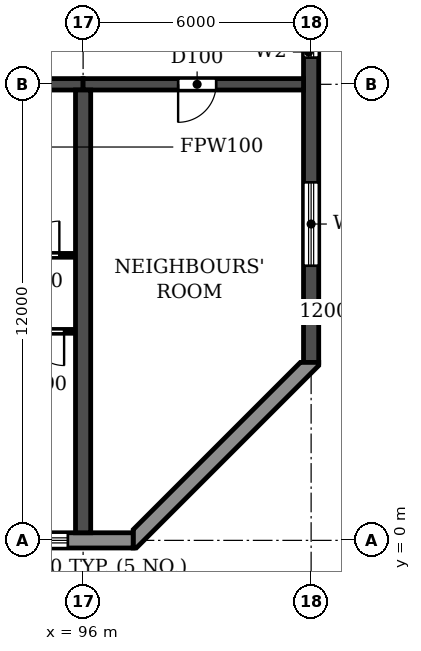
"""IFC4 building model, lengths in metres.
Left out: names, types, materials, properties, quantities, classifications, styles, units other than length and angle.
Written with IfcOpenShell. Run it as: python <this file> out.ifc"""

import sys

from ifc_helpers import new_model, si_unit, direction, frame, frame_2d, origin, place, context, subcontext, project, spatial, polyline, rectangle, outline, extrude, element, fill, save


model = new_model("IFC4")
c1 = context("Model", 3, precision=1e-05, world=origin(), true_north=direction((0.0, 1.0)))
c2 = subcontext(c1, "Body", "Model", "MODEL_VIEW")
j1 = project(units=[si_unit("LENGTHUNIT", "METRE"), si_unit("PLANEANGLEUNIT", "RADIAN")], contexts=[c1])
p1 = place(None, origin())
s1 = spatial("IfcSite", under=j1, at=p1, CompositionType="ELEMENT")
p2 = place(p1, origin())
s2 = spatial("IfcBuilding", under=s1, at=p2, CompositionType="ELEMENT")
p3 = place(p2, frame((0.0, 0.0, 43.2)))
s3 = spatial("IfcBuildingStorey", under=s2, at=p3, CompositionType="ELEMENT", Elevation=43.2)
p4 = place(p3, frame((96.0, 0.2, 0.0), z_axis=(0.0, 0.0, 1.0), x_axis=(0.0, 1.0, 0.0)))
e1 = element("IfcWall", 1, at=p4, inside=s3, PredefinedType="SHEAR", context=c2, shape_type="SweptSolid", body=[
    extrude(rectangle(XDim=11.65, YDim=0.4, at=frame_2d((5.825, 0.0))), origin(), (0.0, 0.0, 1.0), 3.05),
])
p5 = place(p3, frame((102.0, 4.683, 0.0), z_axis=(0.0, 0.0, 1.0), x_axis=(0.0, 1.0, 0.0)))
e2 = element("IfcWall", 2, at=p5, inside=s3, PredefinedType="SHEAR", context=c2, shape_type="SweptSolid", body=[
    extrude(rectangle(XDim=35.434, YDim=0.4, at=frame_2d((17.717, 0.0))), origin(), (0.0, 0.0, 1.0), 3.05),
])
p6 = place(p5, frame((15.917, 0.0, 0.9)))
e3 = element("IfcOpeningElement", 3, at=p6, cuts=e2, PredefinedType="OPENING", context=c2, shape_type="SweptSolid", body=[
    extrude(rectangle(XDim=1.2, YDim=1.5, at=frame_2d((0.6, 0.75))), frame((0.0, 0.21, 0.0), z_axis=(0.0, -1.0, 0.0), x_axis=(1.0, 0.0, 0.0)), (0.0, 0.0, 1.0), 0.42),
])
p7 = place(p5, frame((23.817, 0.0, 0.9)))
e4 = element("IfcOpeningElement", 4, at=p7, cuts=e2, PredefinedType="OPENING", context=c2, shape_type="SweptSolid", body=[
    extrude(rectangle(XDim=1.2, YDim=1.5, at=frame_2d((0.6, 0.75))), frame((0.0, 0.21, 0.0), z_axis=(0.0, -1.0, 0.0), x_axis=(1.0, 0.0, 0.0)), (0.0, 0.0, 1.0), 0.42),
])
p8 = place(p5, frame((8.017, 0.0, 0.9)))
e5 = element("IfcOpeningElement", 5, at=p8, cuts=e2, PredefinedType="OPENING", context=c2, shape_type="SweptSolid", body=[
    extrude(rectangle(XDim=1.2, YDim=1.5, at=frame_2d((0.6, 0.75))), frame((0.0, 0.21, 0.0), z_axis=(0.0, -1.0, 0.0), x_axis=(1.0, 0.0, 0.0)), (0.0, 0.0, 1.0), 0.42),
])
p9 = place(p5, frame((29.493, 0.0, 0.6)))
e6 = element("IfcOpeningElement", 6, at=p9, cuts=e2, PredefinedType="OPENING", context=c2, shape_type="SweptSolid", body=[
    extrude(rectangle(XDim=2.2, YDim=1.8, at=frame_2d((1.1, 0.9))), frame((0.0, 0.21, 0.0), z_axis=(0.0, -1.0, 0.0), x_axis=(1.0, 0.0, 0.0)), (0.0, 0.0, 1.0), 0.42),
])
p10 = place(p5, frame((2.541, 0.0, 0.6)))
e7 = element("IfcOpeningElement", 7, at=p10, cuts=e2, PredefinedType="OPENING", context=c2, shape_type="SweptSolid", body=[
    extrude(rectangle(XDim=2.2, YDim=1.8, at=frame_2d((1.1, 0.9))), frame((0.0, 0.21, 0.0), z_axis=(0.0, -1.0, 0.0), x_axis=(1.0, 0.0, 0.0)), (0.0, 0.0, 1.0), 0.42),
])
p11 = place(p3, frame((90.0, 12.0, 0.0), z_axis=(0.0, 0.0, 1.0), x_axis=(1.0, 0.0, 0.0)))
e8 = element("IfcWall", 8, at=p11, inside=s3, PredefinedType="SHEAR", context=c2, shape_type="SweptSolid", body=[
    extrude(rectangle(XDim=6.0, YDim=0.3, at=frame_2d((3.0, 0.0))), origin(), (0.0, 0.0, 1.0), 2.45),
])
p12 = place(p11, frame((2.45, 0.0, 0.0)))
e9 = element("IfcOpeningElement", 9, at=p12, cuts=e8, PredefinedType="OPENING", context=c2, shape_type="SweptSolid", body=[
    extrude(rectangle(XDim=1.0, YDim=2.1, at=frame_2d((0.5, 1.05))), frame((0.0, 0.16, 0.0), z_axis=(0.0, -1.0, 0.0), x_axis=(1.0, 0.0, 0.0)), (0.0, 0.0, 1.0), 0.32),
])
p13 = place(p3, frame((96.0, 12.0, 0.0), z_axis=(0.0, 0.0, 1.0), x_axis=(1.0, 0.0, 0.0)))
e10 = element("IfcWall", 10, at=p13, inside=s3, PredefinedType="SHEAR", context=c2, shape_type="SweptSolid", body=[
    extrude(rectangle(XDim=5.8, YDim=0.3, at=frame_2d((2.9, 0.0))), origin(), (0.0, 0.0, 1.0), 2.45),
])
p14 = place(p13, frame((2.5, 0.0, 0.0)))
e11 = element("IfcOpeningElement", 11, at=p14, cuts=e10, PredefinedType="OPENING", context=c2, shape_type="SweptSolid", body=[
    extrude(rectangle(XDim=1.0, YDim=2.1, at=frame_2d((0.5, 1.05))), frame((0.0, 0.16, 0.0), z_axis=(0.0, -1.0, 0.0), x_axis=(1.0, 0.0, 0.0)), (0.0, 0.0, 1.0), 0.32),
])
p15 = place(p3, frame((4.683, 0.0, 0.0), z_axis=(0.0, 0.0, 1.0), x_axis=(1.0, 0.0, 0.0)))
e12 = element("IfcWall", 12, at=p15, inside=s3, PredefinedType="STANDARD", context=c2, shape_type="SweptSolid", body=[
    extrude(rectangle(XDim=92.634, YDim=0.4, at=frame_2d((46.317, 0.0))), origin(), (0.0, 0.0, 1.0), 3.05),
])
p16 = place(p15, frame((1.717, 0.0, 0.9)))
e13 = element("IfcOpeningElement", 13, at=p16, cuts=e12, PredefinedType="OPENING", context=c2, shape_type="SweptSolid", body=[
    extrude(rectangle(XDim=2.2, YDim=1.5, at=frame_2d((1.1, 0.75))), frame((0.0, 0.21, 0.0), z_axis=(0.0, -1.0, 0.0), x_axis=(1.0, 0.0, 0.0)), (0.0, 0.0, 1.0), 0.42),
])
p17 = place(p15, frame((4.717, 0.0, 0.9)))
e14 = element("IfcOpeningElement", 14, at=p17, cuts=e12, PredefinedType="OPENING", context=c2, shape_type="SweptSolid", body=[
    extrude(rectangle(XDim=2.2, YDim=1.5, at=frame_2d((1.1, 0.75))), frame((0.0, 0.21, 0.0), z_axis=(0.0, -1.0, 0.0), x_axis=(1.0, 0.0, 0.0)), (0.0, 0.0, 1.0), 0.42),
])
p18 = place(p15, frame((7.717, 0.0, 0.9)))
e15 = element("IfcOpeningElement", 15, at=p18, cuts=e12, PredefinedType="OPENING", context=c2, shape_type="SweptSolid", body=[
    extrude(rectangle(XDim=2.2, YDim=1.5, at=frame_2d((1.1, 0.75))), frame((0.0, 0.21, 0.0), z_axis=(0.0, -1.0, 0.0), x_axis=(1.0, 0.0, 0.0)), (0.0, 0.0, 1.0), 0.42),
])
p19 = place(p15, frame((10.917, 0.0, 0.0)))
e16 = element("IfcOpeningElement", 16, at=p19, cuts=e12, PredefinedType="OPENING", context=c2, shape_type="SweptSolid", body=[
    extrude(rectangle(XDim=1.8, YDim=2.4, at=frame_2d((0.9, 1.2))), frame((0.0, 0.21, 0.0), z_axis=(0.0, -1.0, 0.0), x_axis=(1.0, 0.0, 0.0)), (0.0, 0.0, 1.0), 0.42),
])
p20 = place(p15, frame((13.717, 0.0, 0.9)))
e17 = element("IfcOpeningElement", 17, at=p20, cuts=e12, PredefinedType="OPENING", context=c2, shape_type="SweptSolid", body=[
    extrude(rectangle(XDim=2.2, YDim=1.5, at=frame_2d((1.1, 0.75))), frame((0.0, 0.21, 0.0), z_axis=(0.0, -1.0, 0.0), x_axis=(1.0, 0.0, 0.0)), (0.0, 0.0, 1.0), 0.42),
])
p21 = place(p15, frame((16.717, 0.0, 0.9)))
e18 = element("IfcOpeningElement", 18, at=p21, cuts=e12, PredefinedType="OPENING", context=c2, shape_type="SweptSolid", body=[
    extrude(rectangle(XDim=2.2, YDim=1.5, at=frame_2d((1.1, 0.75))), frame((0.0, 0.21, 0.0), z_axis=(0.0, -1.0, 0.0), x_axis=(1.0, 0.0, 0.0)), (0.0, 0.0, 1.0), 0.42),
])
p22 = place(p15, frame((19.917, 0.0, 0.0)))
e19 = element("IfcOpeningElement", 19, at=p22, cuts=e12, PredefinedType="OPENING", context=c2, shape_type="SweptSolid", body=[
    extrude(rectangle(XDim=1.8, YDim=2.4, at=frame_2d((0.9, 1.2))), frame((0.0, 0.21, 0.0), z_axis=(0.0, -1.0, 0.0), x_axis=(1.0, 0.0, 0.0)), (0.0, 0.0, 1.0), 0.42),
])
p23 = place(p15, frame((22.717, 0.0, 0.9)))
e20 = element("IfcOpeningElement", 20, at=p23, cuts=e12, PredefinedType="OPENING", context=c2, shape_type="SweptSolid", body=[
    extrude(rectangle(XDim=2.2, YDim=1.5, at=frame_2d((1.1, 0.75))), frame((0.0, 0.21, 0.0), z_axis=(0.0, -1.0, 0.0), x_axis=(1.0, 0.0, 0.0)), (0.0, 0.0, 1.0), 0.42),
])
p24 = place(p15, frame((25.717, 0.0, 0.9)))
e21 = element("IfcOpeningElement", 21, at=p24, cuts=e12, PredefinedType="OPENING", context=c2, shape_type="SweptSolid", body=[
    extrude(rectangle(XDim=2.2, YDim=1.5, at=frame_2d((1.1, 0.75))), frame((0.0, 0.21, 0.0), z_axis=(0.0, -1.0, 0.0), x_axis=(1.0, 0.0, 0.0)), (0.0, 0.0, 1.0), 0.42),
])
p25 = place(p15, frame((28.717, 0.0, 0.9)))
e22 = element("IfcOpeningElement", 22, at=p25, cuts=e12, PredefinedType="OPENING", context=c2, shape_type="SweptSolid", body=[
    extrude(rectangle(XDim=2.2, YDim=1.5, at=frame_2d((1.1, 0.75))), frame((0.0, 0.21, 0.0), z_axis=(0.0, -1.0, 0.0), x_axis=(1.0, 0.0, 0.0)), (0.0, 0.0, 1.0), 0.42),
])
p26 = place(p15, frame((31.717, 0.0, 0.9)))
e23 = element("IfcOpeningElement", 23, at=p26, cuts=e12, PredefinedType="OPENING", context=c2, shape_type="SweptSolid", body=[
    extrude(rectangle(XDim=2.2, YDim=1.5, at=frame_2d((1.1, 0.75))), frame((0.0, 0.21, 0.0), z_axis=(0.0, -1.0, 0.0), x_axis=(1.0, 0.0, 0.0)), (0.0, 0.0, 1.0), 0.42),
])
p27 = place(p15, frame((34.917, 0.0, 0.0)))
e24 = element("IfcOpeningElement", 24, at=p27, cuts=e12, PredefinedType="OPENING", context=c2, shape_type="SweptSolid", body=[
    extrude(rectangle(XDim=1.8, YDim=2.4, at=frame_2d((0.9, 1.2))), frame((0.0, 0.21, 0.0), z_axis=(0.0, -1.0, 0.0), x_axis=(1.0, 0.0, 0.0)), (0.0, 0.0, 1.0), 0.42),
])
p28 = place(p15, frame((37.717, 0.0, 0.9)))
e25 = element("IfcOpeningElement", 25, at=p28, cuts=e12, PredefinedType="OPENING", context=c2, shape_type="SweptSolid", body=[
    extrude(rectangle(XDim=2.2, YDim=1.5, at=frame_2d((1.1, 0.75))), frame((0.0, 0.21, 0.0), z_axis=(0.0, -1.0, 0.0), x_axis=(1.0, 0.0, 0.0)), (0.0, 0.0, 1.0), 0.42),
])
p29 = place(p15, frame((40.717, 0.0, 0.9)))
e26 = element("IfcOpeningElement", 26, at=p29, cuts=e12, PredefinedType="OPENING", context=c2, shape_type="SweptSolid", body=[
    extrude(rectangle(XDim=2.2, YDim=1.5, at=frame_2d((1.1, 0.75))), frame((0.0, 0.21, 0.0), z_axis=(0.0, -1.0, 0.0), x_axis=(1.0, 0.0, 0.0)), (0.0, 0.0, 1.0), 0.42),
])
p30 = place(p15, frame((43.717, 0.0, 0.9)))
e27 = element("IfcOpeningElement", 27, at=p30, cuts=e12, PredefinedType="OPENING", context=c2, shape_type="SweptSolid", body=[
    extrude(rectangle(XDim=2.2, YDim=1.5, at=frame_2d((1.1, 0.75))), frame((0.0, 0.21, 0.0), z_axis=(0.0, -1.0, 0.0), x_axis=(1.0, 0.0, 0.0)), (0.0, 0.0, 1.0), 0.42),
])
p31 = place(p15, frame((46.917, 0.0, 0.0)))
e28 = element("IfcOpeningElement", 28, at=p31, cuts=e12, PredefinedType="OPENING", context=c2, shape_type="SweptSolid", body=[
    extrude(rectangle(XDim=1.8, YDim=2.4, at=frame_2d((0.9, 1.2))), frame((0.0, 0.21, 0.0), z_axis=(0.0, -1.0, 0.0), x_axis=(1.0, 0.0, 0.0)), (0.0, 0.0, 1.0), 0.42),
])
p32 = place(p15, frame((49.717, 0.0, 0.9)))
e29 = element("IfcOpeningElement", 29, at=p32, cuts=e12, PredefinedType="OPENING", context=c2, shape_type="SweptSolid", body=[
    extrude(rectangle(XDim=2.2, YDim=1.5, at=frame_2d((1.1, 0.75))), frame((0.0, 0.21, 0.0), z_axis=(0.0, -1.0, 0.0), x_axis=(1.0, 0.0, 0.0)), (0.0, 0.0, 1.0), 0.42),
])
p33 = place(p15, frame((52.717, 0.0, 0.9)))
e30 = element("IfcOpeningElement", 30, at=p33, cuts=e12, PredefinedType="OPENING", context=c2, shape_type="SweptSolid", body=[
    extrude(rectangle(XDim=2.2, YDim=1.5, at=frame_2d((1.1, 0.75))), frame((0.0, 0.21, 0.0), z_axis=(0.0, -1.0, 0.0), x_axis=(1.0, 0.0, 0.0)), (0.0, 0.0, 1.0), 0.42),
])
p34 = place(p15, frame((55.717, 0.0, 0.9)))
e31 = element("IfcOpeningElement", 31, at=p34, cuts=e12, PredefinedType="OPENING", context=c2, shape_type="SweptSolid", body=[
    extrude(rectangle(XDim=2.2, YDim=1.5, at=frame_2d((1.1, 0.75))), frame((0.0, 0.21, 0.0), z_axis=(0.0, -1.0, 0.0), x_axis=(1.0, 0.0, 0.0)), (0.0, 0.0, 1.0), 0.42),
])
p35 = place(p15, frame((58.917, 0.0, 0.0)))
e32 = element("IfcOpeningElement", 32, at=p35, cuts=e12, PredefinedType="OPENING", context=c2, shape_type="SweptSolid", body=[
    extrude(rectangle(XDim=1.8, YDim=2.4, at=frame_2d((0.9, 1.2))), frame((0.0, 0.21, 0.0), z_axis=(0.0, -1.0, 0.0), x_axis=(1.0, 0.0, 0.0)), (0.0, 0.0, 1.0), 0.42),
])
p36 = place(p15, frame((61.717, 0.0, 0.9)))
e33 = element("IfcOpeningElement", 33, at=p36, cuts=e12, PredefinedType="OPENING", context=c2, shape_type="SweptSolid", body=[
    extrude(rectangle(XDim=2.2, YDim=1.5, at=frame_2d((1.1, 0.75))), frame((0.0, 0.21, 0.0), z_axis=(0.0, -1.0, 0.0), x_axis=(1.0, 0.0, 0.0)), (0.0, 0.0, 1.0), 0.42),
])
p37 = place(p15, frame((64.717, 0.0, 0.9)))
e34 = element("IfcOpeningElement", 34, at=p37, cuts=e12, PredefinedType="OPENING", context=c2, shape_type="SweptSolid", body=[
    extrude(rectangle(XDim=2.2, YDim=1.5, at=frame_2d((1.1, 0.75))), frame((0.0, 0.21, 0.0), z_axis=(0.0, -1.0, 0.0), x_axis=(1.0, 0.0, 0.0)), (0.0, 0.0, 1.0), 0.42),
])
p38 = place(p15, frame((67.717, 0.0, 0.9)))
e35 = element("IfcOpeningElement", 35, at=p38, cuts=e12, PredefinedType="OPENING", context=c2, shape_type="SweptSolid", body=[
    extrude(rectangle(XDim=2.2, YDim=1.5, at=frame_2d((1.1, 0.75))), frame((0.0, 0.21, 0.0), z_axis=(0.0, -1.0, 0.0), x_axis=(1.0, 0.0, 0.0)), (0.0, 0.0, 1.0), 0.42),
])
p39 = place(p15, frame((70.917, 0.0, 0.0)))
e36 = element("IfcOpeningElement", 36, at=p39, cuts=e12, PredefinedType="OPENING", context=c2, shape_type="SweptSolid", body=[
    extrude(rectangle(XDim=1.8, YDim=2.4, at=frame_2d((0.9, 1.2))), frame((0.0, 0.21, 0.0), z_axis=(0.0, -1.0, 0.0), x_axis=(1.0, 0.0, 0.0)), (0.0, 0.0, 1.0), 0.42),
])
p40 = place(p15, frame((73.717, 0.0, 0.9)))
e37 = element("IfcOpeningElement", 37, at=p40, cuts=e12, PredefinedType="OPENING", context=c2, shape_type="SweptSolid", body=[
    extrude(rectangle(XDim=2.2, YDim=1.5, at=frame_2d((1.1, 0.75))), frame((0.0, 0.21, 0.0), z_axis=(0.0, -1.0, 0.0), x_axis=(1.0, 0.0, 0.0)), (0.0, 0.0, 1.0), 0.42),
])
p41 = place(p15, frame((76.717, 0.0, 0.9)))
e38 = element("IfcOpeningElement", 38, at=p41, cuts=e12, PredefinedType="OPENING", context=c2, shape_type="SweptSolid", body=[
    extrude(rectangle(XDim=2.2, YDim=1.5, at=frame_2d((1.1, 0.75))), frame((0.0, 0.21, 0.0), z_axis=(0.0, -1.0, 0.0), x_axis=(1.0, 0.0, 0.0)), (0.0, 0.0, 1.0), 0.42),
])
p42 = place(p15, frame((79.717, 0.0, 0.9)))
e39 = element("IfcOpeningElement", 39, at=p42, cuts=e12, PredefinedType="OPENING", context=c2, shape_type="SweptSolid", body=[
    extrude(rectangle(XDim=2.2, YDim=1.5, at=frame_2d((1.1, 0.75))), frame((0.0, 0.21, 0.0), z_axis=(0.0, -1.0, 0.0), x_axis=(1.0, 0.0, 0.0)), (0.0, 0.0, 1.0), 0.42),
])
p43 = place(p15, frame((82.917, 0.0, 0.0)))
e40 = element("IfcOpeningElement", 40, at=p43, cuts=e12, PredefinedType="OPENING", context=c2, shape_type="SweptSolid", body=[
    extrude(rectangle(XDim=1.8, YDim=2.4, at=frame_2d((0.9, 1.2))), frame((0.0, 0.21, 0.0), z_axis=(0.0, -1.0, 0.0), x_axis=(1.0, 0.0, 0.0)), (0.0, 0.0, 1.0), 0.42),
])
p44 = place(p15, frame((85.717, 0.0, 0.9)))
e41 = element("IfcOpeningElement", 41, at=p44, cuts=e12, PredefinedType="OPENING", context=c2, shape_type="SweptSolid", body=[
    extrude(rectangle(XDim=2.2, YDim=1.5, at=frame_2d((1.1, 0.75))), frame((0.0, 0.21, 0.0), z_axis=(0.0, -1.0, 0.0), x_axis=(1.0, 0.0, 0.0)), (0.0, 0.0, 1.0), 0.42),
])
p45 = place(p15, frame((88.717, 0.0, 0.9)))
e42 = element("IfcOpeningElement", 42, at=p45, cuts=e12, PredefinedType="OPENING", context=c2, shape_type="SweptSolid", body=[
    extrude(rectangle(XDim=2.2, YDim=1.5, at=frame_2d((1.1, 0.75))), frame((0.0, 0.21, 0.0), z_axis=(0.0, -1.0, 0.0), x_axis=(1.0, 0.0, 0.0)), (0.0, 0.0, 1.0), 0.42),
])
p46 = place(p3, origin())
e43 = element("IfcWall", 43, at=p46, inside=s3, PredefinedType="STANDARD", context=c2, shape_type="SweptSolid", body=[
    extrude(outline(polyline([(97.317, -0.2), (97.4, -0.2), (102.2, 4.6), (102.2, 4.683), (101.717, 4.683), (97.317, 0.283), (97.317, -0.2)])), origin(), (0.0, 0.0, 1.0), 3.05),
])
p47 = place(p3, frame((92.95, 5.5, 0.0), z_axis=(0.0, 0.0, 1.0), x_axis=(1.0, 0.0, 0.0)))
e44 = element("IfcWall", 44, at=p47, inside=s3, PredefinedType="PARTITIONING", context=c2, shape_type="SweptSolid", body=[
    extrude(rectangle(XDim=2.84, YDim=0.1, at=frame_2d((1.42, 0.0))), origin(), (0.0, 0.0, 1.0), 3.05),
])
p48 = place(p47, frame((1.65, 0.0, 0.0)))
e45 = element("IfcOpeningElement", 45, at=p48, cuts=e44, PredefinedType="OPENING", context=c2, shape_type="SweptSolid", body=[
    extrude(rectangle(XDim=0.9, YDim=2.1, at=frame_2d((0.45, 1.05))), frame((0.0, 0.06, 0.0), z_axis=(0.0, -1.0, 0.0), x_axis=(1.0, 0.0, 0.0)), (0.0, 0.0, 1.0), 0.12),
])
p49 = place(p3, frame((93.8, 7.5, 0.0), z_axis=(0.0, 0.0, 1.0), x_axis=(1.0, 0.0, 0.0)))
e46 = element("IfcWall", 46, at=p49, inside=s3, PredefinedType="PARTITIONING", context=c2, shape_type="SweptSolid", body=[
    extrude(rectangle(XDim=1.99, YDim=0.1, at=frame_2d((0.995, 0.0))), origin(), (0.0, 0.0, 1.0), 3.05),
])
p50 = place(p49, frame((0.675, 0.0, 0.0)))
e47 = element("IfcOpeningElement", 47, at=p50, cuts=e46, PredefinedType="OPENING", context=c2, shape_type="SweptSolid", body=[
    extrude(rectangle(XDim=0.9, YDim=2.1, at=frame_2d((0.45, 1.05))), frame((0.0, 0.06, 0.0), z_axis=(0.0, -1.0, 0.0), x_axis=(1.0, 0.0, 0.0)), (0.0, 0.0, 1.0), 0.12),
])
p51 = place(p45, origin())
e48 = element("IfcWindow", 48, at=p51, inside=s3, PartitioningType="DOUBLE_PANEL_HORIZONTAL", PredefinedType="WINDOW", context=c2, shape_type="SweptSolid", body=[
    extrude(rectangle(XDim=2.2, YDim=1.5, at=frame_2d((1.1, 0.75))), frame((0.0, 0.03, 0.0), z_axis=(0.0, -1.0, 0.0), x_axis=(1.0, 0.0, 0.0)), (0.0, 0.0, 1.0), 0.06),
])
fill(e42, e48)
p52 = place(p8, origin())
e49 = element("IfcWindow", 49, at=p52, inside=s3, PartitioningType="SINGLE_PANEL", PredefinedType="WINDOW", context=c2, shape_type="SweptSolid", body=[
    extrude(rectangle(XDim=1.2, YDim=1.5, at=frame_2d((0.6, 0.75))), frame((0.0, 0.03, 0.0), z_axis=(0.0, -1.0, 0.0), x_axis=(1.0, 0.0, 0.0)), (0.0, 0.0, 1.0), 0.06),
])
fill(e5, e49)
p53 = place(p10, origin())
e50 = element("IfcWindow", 50, at=p53, inside=s3, PartitioningType="DOUBLE_PANEL_HORIZONTAL", PredefinedType="WINDOW", context=c2, shape_type="SweptSolid", body=[
    extrude(rectangle(XDim=2.2, YDim=1.8, at=frame_2d((1.1, 0.9))), frame((0.0, 0.03, 0.0), z_axis=(0.0, -1.0, 0.0), x_axis=(1.0, 0.0, 0.0)), (0.0, 0.0, 1.0), 0.06),
])
fill(e7, e50)
p54 = place(p50, origin())
e51 = element("IfcDoor", 51, at=p54, inside=s3, OperationType="SINGLE_SWING_RIGHT", PredefinedType="DOOR", context=c2, shape_type="SweptSolid", body=[
    extrude(rectangle(XDim=0.9, YDim=2.1, at=frame_2d((0.45, 1.05))), frame((0.0, 0.025, 0.0), z_axis=(0.0, -1.0, 0.0), x_axis=(1.0, 0.0, 0.0)), (0.0, 0.0, 1.0), 0.05),
])
fill(e47, e51)
p55 = place(p48, frame((0.9, 0.0, 0.0), z_axis=(0.0, 0.0, 1.0), x_axis=(-1.0, 0.0, 0.0)))
e52 = element("IfcDoor", 52, at=p55, inside=s3, OperationType="SINGLE_SWING_LEFT", PredefinedType="DOOR", context=c2, shape_type="SweptSolid", body=[
    extrude(rectangle(XDim=0.9, YDim=2.1, at=frame_2d((0.45, 1.05))), frame((0.0, 0.025, 0.0), z_axis=(0.0, -1.0, 0.0), x_axis=(1.0, 0.0, 0.0)), (0.0, 0.0, 1.0), 0.05),
])
fill(e45, e52)
p56 = place(p14, frame((1.0, 0.0, 0.0), z_axis=(0.0, 0.0, 1.0), x_axis=(-1.0, 0.0, 0.0)))
e53 = element("IfcDoor", 53, at=p56, inside=s3, OperationType="SINGLE_SWING_RIGHT", PredefinedType="DOOR", context=c2, shape_type="SweptSolid", body=[
    extrude(rectangle(XDim=1.0, YDim=2.1, at=frame_2d((0.5, 1.05))), frame((0.0, 0.025, 0.0), z_axis=(0.0, -1.0, 0.0), x_axis=(1.0, 0.0, 0.0)), (0.0, 0.0, 1.0), 0.05),
])
fill(e11, e53)
save(model, sys.argv[1])
